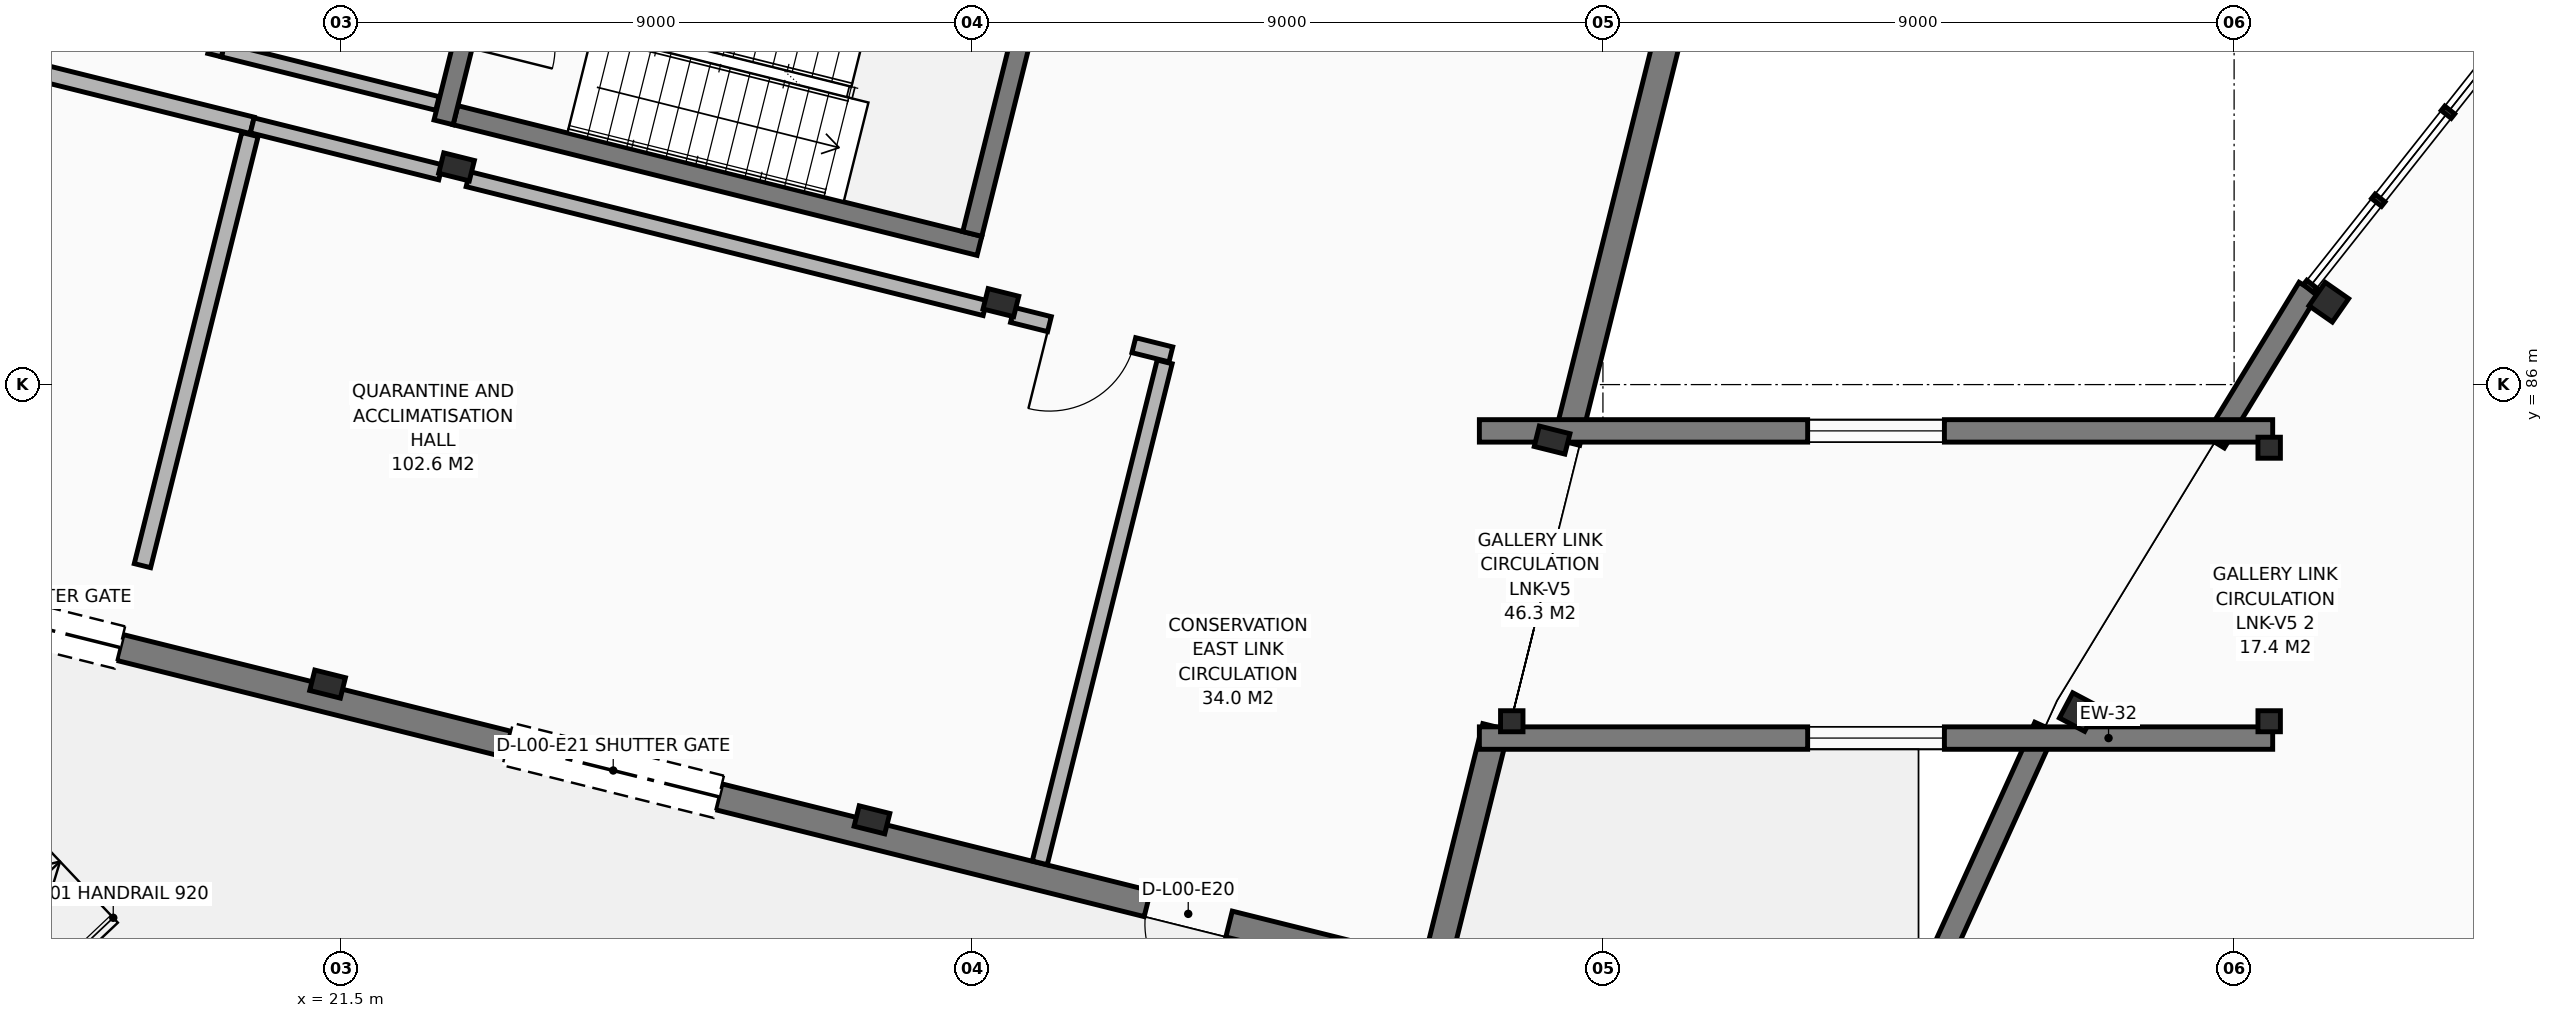
"""IFC4 building model, lengths in metres.
Left out: names, types, materials, properties, quantities, classifications, styles, units other than length and angle.
Written with IfcOpenShell. Run it as: python <this file> out.ifc"""

import sys

from ifc_helpers import new_model, si_unit, direction, frame, frame_2d, origin, origin_2d, place, context, subcontext, project, spatial, rectangle, hollow_circle, i_section, extrude, element, fill, save


model = new_model("IFC4")
c1 = context("Model", 3, precision=1e-05, world=origin(), true_north=direction((0.0, 1.0)))
c2 = subcontext(c1, "Body", "Model", "MODEL_VIEW")
j1 = project(units=[si_unit("LENGTHUNIT", "METRE"), si_unit("PLANEANGLEUNIT", "RADIAN")], contexts=[c1])
p1 = place(None, origin())
s1 = spatial("IfcSite", under=j1, at=p1, CompositionType="ELEMENT")
p2 = place(p1, origin())
s2 = spatial("IfcBuilding", under=s1, at=p2, CompositionType="ELEMENT")
p3 = place(p2, origin())
s3 = spatial("IfcBuildingStorey", under=s2, at=p3, CompositionType="ELEMENT", Elevation=0.0)
for number, where, z_axis, x_axis in (
    (1, (49.85, 87.175, 0.0), (0.0, 0.0, 1.0), (0.82, -0.572, 0.0)),
    (2, (46.284, 81.331, 0.0), (0.0, 0.0, 1.0), (0.884, -0.468, 0.0)),
):
    element("IfcColumn", number, at=place(p3, frame(where, z_axis=z_axis, x_axis=x_axis)), inside=s3, PredefinedType="COLUMN", context=c2, shape_type="SweptSolid", body=[
        extrude(hollow_circle(Radius=0.203, WallThickness=0.02, at=origin_2d()), origin(), (0.0, 0.0, 1.0), 5.1),
    ])
for number, where, z_axis, x_axis in (
    (3, (21.315, 81.73, 0.0), (0.0, 0.0, 1.0), (0.97, -0.242, 0.0)),
    (4, (23.153, 89.104, 0.0), (0.0, 0.0, 1.0), (0.97, -0.242, 0.0)),
    (5, (29.077, 79.794, 0.0), (0.0, 0.0, 1.0), (0.97, -0.242, 0.0)),
    (6, (30.916, 87.169, 0.0), (0.0, 0.0, 1.0), (0.97, -0.242, 0.0)),
    (7, (38.775, 85.209, 0.0), (0.0, 0.0, 1.0), (0.97, -0.242, 0.0)),
):
    element("IfcColumn", number, at=place(p3, frame(where, z_axis=z_axis, x_axis=x_axis)), inside=s3, PredefinedType="COLUMN", context=c2, shape_type="SweptSolid", body=[
        extrude(i_section(OverallWidth=0.3, OverallDepth=0.45, WebThickness=0.014, FlangeThickness=0.026, FilletRadius=0.027, at=origin_2d()), origin(), (0.0, 0.0, 1.0), 5.1),
    ])
for number, where, z_axis, x_axis in (
    (8, (38.2, 81.2, 0.0), (0.0, 0.0, 1.0), (1.0, 0.0, 0.0)),
    (9, (49.0, 81.2, 0.0), (0.0, 0.0, 1.0), (1.0, 0.0, 0.0)),
    (10, (49.0, 85.1, 0.0), (0.0, 0.0, 1.0), (1.0, 0.0, 0.0)),
):
    element("IfcColumn", number, at=place(p3, frame(where, z_axis=z_axis, x_axis=x_axis)), inside=s3, PredefinedType="COLUMN", context=c2, shape_type="SweptSolid", body=[
        extrude(i_section(OverallWidth=0.3, OverallDepth=0.32, WebThickness=0.011, FlangeThickness=0.021, FilletRadius=0.027, at=origin_2d()), origin(), (0.0, 0.0, 1.0), 5.1),
    ])
p4 = place(p3, frame((48.223, 85.18, 0.0), z_axis=(0.0, 0.0, 1.0), x_axis=(0.520931481082, 0.853598495792, 0.0)))
e11 = element("IfcWall", 11, at=p4, inside=s3, PredefinedType="SOLIDWALL", context=c2, shape_type="SweptSolid", body=[
    extrude(rectangle(XDim=2.572, YDim=0.32, at=frame_2d((1.286, 0.0))), origin(), (0.0, 0.0, 1.0), 4.88),
])
p5 = place(p3, frame((43.127, 75.222, 0.0), z_axis=(0.0, 0.0, 1.0), x_axis=(0.41336840626, 0.910563869647, 0.0)))
e12 = element("IfcWall", 12, at=p5, inside=s3, PredefinedType="SOLIDWALL", context=c2, shape_type="SweptSolid", body=[
    extrude(rectangle(XDim=6.477, YDim=0.32, at=frame_2d((3.239, 0.0))), origin(), (0.0, 0.0, 1.0), 4.88),
])
p6 = place(p3, frame((42.608, 99.713, 0.0), z_axis=(0.0, 0.0, 1.0), x_axis=(-0.241914242385, -0.970297634405, 0.0)))
e13 = element("IfcWall", 13, at=p6, inside=s3, PredefinedType="SOLIDWALL", context=c2, shape_type="SweptSolid", body=[
    extrude(rectangle(XDim=14.978, YDim=0.38, at=frame_2d((7.489, 0.0))), origin(), (0.0, 0.0, 1.0), 4.88),
])
p7 = place(p6, frame((1.6, 0.0, 0.85)))
e14 = element("IfcOpeningElement", 14, at=p7, cuts=e13, PredefinedType="OPENING", context=c2, shape_type="SweptSolid", body=[
    extrude(rectangle(XDim=1.5, YDim=1.7, at=frame_2d((0.75, 0.85))), frame((0.0, 0.2, 0.0), z_axis=(0.0, -1.0, 0.0), x_axis=(1.0, 0.0, 0.0)), (0.0, 0.0, 1.0), 0.4),
])
p8 = place(p3, frame((37.972, 81.12, 0.0), z_axis=(0.0, 0.0, 1.0), x_axis=(-0.241905764761, -0.970299748003, 0.0)))
e15 = element("IfcWall", 15, at=p8, inside=s3, PredefinedType="SOLIDWALL", context=c2, shape_type="SweptSolid", body=[
    extrude(rectangle(XDim=3.648, YDim=0.38, at=frame_2d((1.824, 0.0))), origin(), (0.0, 0.0, 1.0), 4.88),
])
p9 = place(p3, frame((37.274, 77.534, 0.0), z_axis=(0.0, 0.0, 1.0), x_axis=(-0.970295504299, 0.2419227859, 0.0)))
e16 = element("IfcWall", 16, at=p9, inside=s3, PredefinedType="SOLIDWALL", context=c2, shape_type="SweptSolid", body=[
    extrude(rectangle(XDim=32.81, YDim=0.38, at=frame_2d((16.405, 0.0))), origin(), (0.0, 0.0, 1.0), 4.88),
])
p10 = place(p9, frame((3.2, 0.0, 0.0)))
e17 = element("IfcOpeningElement", 17, at=p10, cuts=e16, PredefinedType="OPENING", context=c2, shape_type="SweptSolid", body=[
    extrude(rectangle(XDim=1.2, YDim=2.15, at=frame_2d((0.6, 1.075))), frame((0.0, 0.2, 0.0), z_axis=(0.0, -1.0, 0.0), x_axis=(1.0, 0.0, 0.0)), (0.0, 0.0, 1.0), 0.4),
])
p11 = place(p9, frame((10.7, 0.0, 0.0)))
e18 = element("IfcOpeningElement", 18, at=p11, cuts=e16, PredefinedType="OPENING", context=c2, shape_type="SweptSolid", body=[
    extrude(rectangle(XDim=3.1, YDim=3.1, at=frame_2d((1.55, 1.55))), frame((0.0, 0.2, 0.0), z_axis=(0.0, -1.0, 0.0), x_axis=(1.0, 0.0, 0.0)), (0.0, 0.0, 1.0), 0.4),
])
p12 = place(p9, frame((19.5, 0.0, 0.0)))
e19 = element("IfcOpeningElement", 19, at=p12, cuts=e16, PredefinedType="OPENING", context=c2, shape_type="SweptSolid", body=[
    extrude(rectangle(XDim=3.1, YDim=3.1, at=frame_2d((1.55, 1.55))), frame((0.0, 0.2, 0.0), z_axis=(0.0, -1.0, 0.0), x_axis=(1.0, 0.0, 0.0)), (0.0, 0.0, 1.0), 0.4),
])
p13 = place(p9, frame((26.01, 0.0, 0.0)))
e20 = element("IfcOpeningElement", 20, at=p13, cuts=e16, PredefinedType="OPENING", context=c2, shape_type="SweptSolid", body=[
    extrude(rectangle(XDim=3.8, YDim=3.5, at=frame_2d((1.9, 1.75))), frame((0.0, 0.2, 0.0), z_axis=(0.0, -1.0, 0.0), x_axis=(1.0, 0.0, 0.0)), (0.0, 0.0, 1.0), 0.4),
])
p14 = place(p3, frame((49.05, 80.96, 0.0), z_axis=(0.0, 0.0, 1.0), x_axis=(-1.0, 0.0, 0.0)))
e21 = element("IfcWall", 21, at=p14, inside=s3, PredefinedType="SOLIDWALL", context=c2, shape_type="SweptSolid", body=[
    extrude(rectangle(XDim=11.312, YDim=0.32, at=frame_2d((5.656, 0.0))), origin(), (0.0, 0.0, 1.0), 4.82),
])
p15 = place(p14, frame((4.681, 0.0, 1.12)))
e22 = element("IfcOpeningElement", 22, at=p15, cuts=e21, PredefinedType="OPENING", context=c2, shape_type="SweptSolid", body=[
    extrude(rectangle(XDim=1.95, YDim=1.5, at=frame_2d((0.975, 0.75))), frame((0.0, 0.17, 0.0), z_axis=(0.0, -1.0, 0.0), x_axis=(1.0, 0.0, 0.0)), (0.0, 0.0, 1.0), 0.34),
])
p16 = place(p3, frame((37.738, 85.34, 0.0), z_axis=(0.0, 0.0, 1.0), x_axis=(1.0, 0.0, 0.0)))
e23 = element("IfcWall", 23, at=p16, inside=s3, PredefinedType="SOLIDWALL", context=c2, shape_type="SweptSolid", body=[
    extrude(rectangle(XDim=11.312, YDim=0.32, at=frame_2d((5.656, 0.0))), origin(), (0.0, 0.0, 1.0), 4.82),
])
p17 = place(p16, frame((4.681, 0.0, 1.12)))
e24 = element("IfcOpeningElement", 24, at=p17, cuts=e23, PredefinedType="OPENING", context=c2, shape_type="SweptSolid", body=[
    extrude(rectangle(XDim=1.95, YDim=1.5, at=frame_2d((0.975, 0.75))), frame((0.0, 0.17, 0.0), z_axis=(0.0, -1.0, 0.0), x_axis=(1.0, 0.0, 0.0)), (0.0, 0.0, 1.0), 0.34),
])
p18 = place(p3, frame((23.138, 89.841, 0.0), z_axis=(0.0, 0.0, 1.0), x_axis=(0.970295246537, -0.24192381972, 0.0)))
e25 = element("IfcWall", 25, at=p18, inside=s3, PredefinedType="SHEAR", context=c2, shape_type="SweptSolid", body=[
    extrude(rectangle(XDim=7.7, YDim=0.28, at=frame_2d((3.85, 0.0))), origin(), (0.0, 0.0, 1.0), 4.88),
])
p19 = place(p3, frame((30.508, 88.148, 0.0), z_axis=(0.0, 0.0, 1.0), x_axis=(0.241920098373, 0.970296174373, 0.0)))
e26 = element("IfcWall", 26, at=p19, inside=s3, PredefinedType="SHEAR", context=c2, shape_type="SweptSolid", body=[
    extrude(rectangle(XDim=3.08, YDim=0.28, at=frame_2d((1.54, 0.0))), origin(), (0.0, 0.0, 1.0), 4.88),
])
p20 = place(p3, frame((24.623, 96.376, 0.0), z_axis=(0.0, 0.0, 1.0), x_axis=(-0.241922508616, -0.970295573434, 0.0)))
e27 = element("IfcWall", 27, at=p20, inside=s3, PredefinedType="SHEAR", context=c2, shape_type="SweptSolid", body=[
    extrude(rectangle(XDim=6.84, YDim=0.28, at=frame_2d((3.42, 0.0))), origin(), (0.0, 0.0, 1.0), 4.88),
])
p21 = place(p20, frame((0.75, 0.0, 0.0)))
e28 = element("IfcOpeningElement", 28, at=p21, cuts=e27, PredefinedType="OPENING", context=c2, shape_type="SweptSolid", body=[
    extrude(rectangle(XDim=2.0, YDim=2.3, at=frame_2d((1.0, 1.15))), frame((0.0, 0.15, 0.0), z_axis=(0.0, -1.0, 0.0), x_axis=(1.0, 0.0, 0.0)), (0.0, 0.0, 1.0), 0.3),
])
p22 = place(p20, frame((4.4, 0.0, 0.0)))
e29 = element("IfcOpeningElement", 29, at=p22, cuts=e27, PredefinedType="OPENING", context=c2, shape_type="SweptSolid", body=[
    extrude(rectangle(XDim=1.32, YDim=2.12, at=frame_2d((0.66, 1.06))), frame((0.0, 0.15, 0.0), z_axis=(0.0, -1.0, 0.0), x_axis=(1.0, 0.0, 0.0)), (0.0, 0.0, 1.0), 0.3),
])
p23 = place(p3, frame((19.824, 90.77, 0.0), z_axis=(0.0, 0.0, 1.0), x_axis=(0.970306396763, -0.241879094592, 0.0)))
e30 = element("IfcWall", 30, at=p23, inside=s3, PredefinedType="PARTITIONING", context=c2, shape_type="SweptSolid", body=[
    extrude(rectangle(XDim=3.15, YDim=0.2, at=frame_2d((1.575, 0.0))), origin(), (0.0, 0.0, 1.0), 4.88),
])
p24 = place(p3, frame((19.703, 90.698, 0.0), z_axis=(0.0, 0.0, 1.0), x_axis=(0.24192671796, 0.970294523914, 0.0)))
e31 = element("IfcWall", 31, at=p24, inside=s3, PredefinedType="PARTITIONING", context=c2, shape_type="SweptSolid", body=[
    extrude(rectangle(XDim=6.51, YDim=0.2, at=frame_2d((3.255, 0.0))), origin(), (0.0, 0.0, 1.0), 4.37),
])
p25 = place(p24, frame((2.515, 0.0, 0.0)))
e32 = element("IfcOpeningElement", 32, at=p25, cuts=e31, PredefinedType="OPENING", context=c2, shape_type="SweptSolid", body=[
    extrude(rectangle(XDim=1.48, YDim=2.15, at=frame_2d((0.74, 1.075))), frame((0.0, 0.11, 0.0), z_axis=(0.0, -1.0, 0.0), x_axis=(1.0, 0.0, 0.0)), (0.0, 0.0, 1.0), 0.22),
])
p26 = place(p3, frame((20.24, 89.696, 0.0), z_axis=(0.0, 0.0, 1.0), x_axis=(-0.970291030499, 0.241940728553, 0.0)))
e33 = element("IfcWall", 33, at=p26, inside=s3, PredefinedType="PARTITIONING", context=c2, shape_type="SweptSolid", body=[
    extrude(rectangle(XDim=4.829, YDim=0.24, at=frame_2d((2.414, 0.0))), origin(), (0.0, 0.0, 1.0), 4.37),
])
p27 = place(p3, frame((30.689, 87.091, 0.0), z_axis=(0.0, 0.0, 1.0), x_axis=(-0.970295427473, 0.241923094029, 0.0)))
e34 = element("IfcWall", 34, at=p27, inside=s3, PredefinedType="PARTITIONING", context=c2, shape_type="SweptSolid", body=[
    extrude(rectangle(XDim=7.597, YDim=0.22, at=frame_2d((3.798, 0.0))), origin(), (0.0, 0.0, 1.0), 4.37),
])
p28 = place(p3, frame((22.927, 89.027, 0.0), z_axis=(0.0, 0.0, 1.0), x_axis=(-0.97030825466, 0.241871641452, 0.0)))
e35 = element("IfcWall", 35, at=p28, inside=s3, PredefinedType="PARTITIONING", context=c2, shape_type="SweptSolid", body=[
    extrude(rectangle(XDim=2.769, YDim=0.22, at=frame_2d((1.384, 0.0))), origin(), (0.0, 0.0, 1.0), 4.37),
])
p29 = place(p3, frame((33.339, 86.43, 0.0), z_axis=(0.0, 0.0, 1.0), x_axis=(-0.970308784597, 0.241869515512, 0.0)))
e36 = element("IfcWall", 36, at=p29, inside=s3, PredefinedType="PARTITIONING", context=c2, shape_type="SweptSolid", body=[
    extrude(rectangle(XDim=2.329, YDim=0.22, at=frame_2d((1.164, 0.0))), origin(), (0.0, 0.0, 1.0), 4.37),
])
p30 = place(p29, frame((0.544, 0.0, 0.0)))
e37 = element("IfcOpeningElement", 37, at=p30, cuts=e36, PredefinedType="OPENING", context=c2, shape_type="SweptSolid", body=[
    extrude(rectangle(XDim=1.24, YDim=2.15, at=frame_2d((0.62, 1.075))), frame((0.0, 0.12, 0.0), z_axis=(0.0, -1.0, 0.0), x_axis=(1.0, 0.0, 0.0)), (0.0, 0.0, 1.0), 0.24),
])
p31 = place(p3, frame((31.47, 79.181, 0.0), z_axis=(0.0, 0.0, 1.0), x_axis=(0.241919062701, 0.970296432592, 0.0)))
e38 = element("IfcWall", 38, at=p31, inside=s3, PredefinedType="PARTITIONING", context=c2, shape_type="SweptSolid", body=[
    extrude(rectangle(XDim=7.361, YDim=0.22, at=frame_2d((3.681, 0.0))), origin(), (0.0, 0.0, 1.0), 4.37),
])
p32 = place(p3, frame((20.208, 89.565, 0.0), z_axis=(0.0, 0.0, 1.0), x_axis=(-0.241937117418, -0.970291930924, 0.0)))
e39 = element("IfcWall", 39, at=p32, inside=s3, PredefinedType="PARTITIONING", context=c2, shape_type="SweptSolid", body=[
    extrude(rectangle(XDim=6.335, YDim=0.24, at=frame_2d((3.167, 0.0))), origin(), (0.0, 0.0, 1.0), 4.37),
])
p33 = place(p10, origin())
e40 = element("IfcDoor", 40, at=p33, inside=s3, OperationType="SINGLE_SWING_LEFT", PredefinedType="DOOR", context=c2, shape_type="SweptSolid", body=[
    extrude(rectangle(XDim=1.2, YDim=2.15, at=frame_2d((0.6, 1.075))), frame((0.0, 0.025, 0.0), z_axis=(0.0, -1.0, 0.0), x_axis=(1.0, 0.0, 0.0)), (0.0, 0.0, 1.0), 0.05),
])
fill(e17, e40)
p34 = place(p11, origin())
e41 = element("IfcDoor", 41, at=p34, inside=s3, OperationType="ROLLINGUP", PredefinedType="GATE", context=c2, shape_type="SweptSolid", body=[
    extrude(rectangle(XDim=3.1, YDim=3.1, at=frame_2d((1.55, 1.55))), frame((0.0, 0.025, 0.0), z_axis=(0.0, -1.0, 0.0), x_axis=(1.0, 0.0, 0.0)), (0.0, 0.0, 1.0), 0.05),
])
fill(e18, e41)
p35 = place(p12, origin())
e42 = element("IfcDoor", 42, at=p35, inside=s3, OperationType="ROLLINGUP", PredefinedType="GATE", context=c2, shape_type="SweptSolid", body=[
    extrude(rectangle(XDim=3.1, YDim=3.1, at=frame_2d((1.55, 1.55))), frame((0.0, 0.025, 0.0), z_axis=(0.0, -1.0, 0.0), x_axis=(1.0, 0.0, 0.0)), (0.0, 0.0, 1.0), 0.05),
])
fill(e19, e42)
p36 = place(p15, origin())
e43 = element("IfcWindow", 43, at=p36, inside=s3, PartitioningType="SINGLE_PANEL", PredefinedType="WINDOW", context=c2, shape_type="SweptSolid", body=[
    extrude(rectangle(XDim=1.95, YDim=1.5, at=frame_2d((0.975, 0.75))), frame((0.0, 0.03, 0.0), z_axis=(0.0, -1.0, 0.0), x_axis=(1.0, 0.0, 0.0)), (0.0, 0.0, 1.0), 0.06),
])
fill(e22, e43)
p37 = place(p17, origin())
e44 = element("IfcWindow", 44, at=p37, inside=s3, PartitioningType="SINGLE_PANEL", PredefinedType="WINDOW", context=c2, shape_type="SweptSolid", body=[
    extrude(rectangle(XDim=1.95, YDim=1.5, at=frame_2d((0.975, 0.75))), frame((0.0, 0.03, 0.0), z_axis=(0.0, -1.0, 0.0), x_axis=(1.0, 0.0, 0.0)), (0.0, 0.0, 1.0), 0.06),
])
fill(e24, e44)
p38 = place(p30, origin())
e45 = element("IfcDoor", 45, at=p38, inside=s3, OperationType="SINGLE_SWING_RIGHT", PredefinedType="DOOR", context=c2, shape_type="SweptSolid", body=[
    extrude(rectangle(XDim=1.24, YDim=2.15, at=frame_2d((0.62, 1.075))), frame((0.0, 0.025, 0.0), z_axis=(0.0, -1.0, 0.0), x_axis=(1.0, 0.0, 0.0)), (0.0, 0.0, 1.0), 0.05),
])
fill(e37, e45)
save(model, sys.argv[1])
